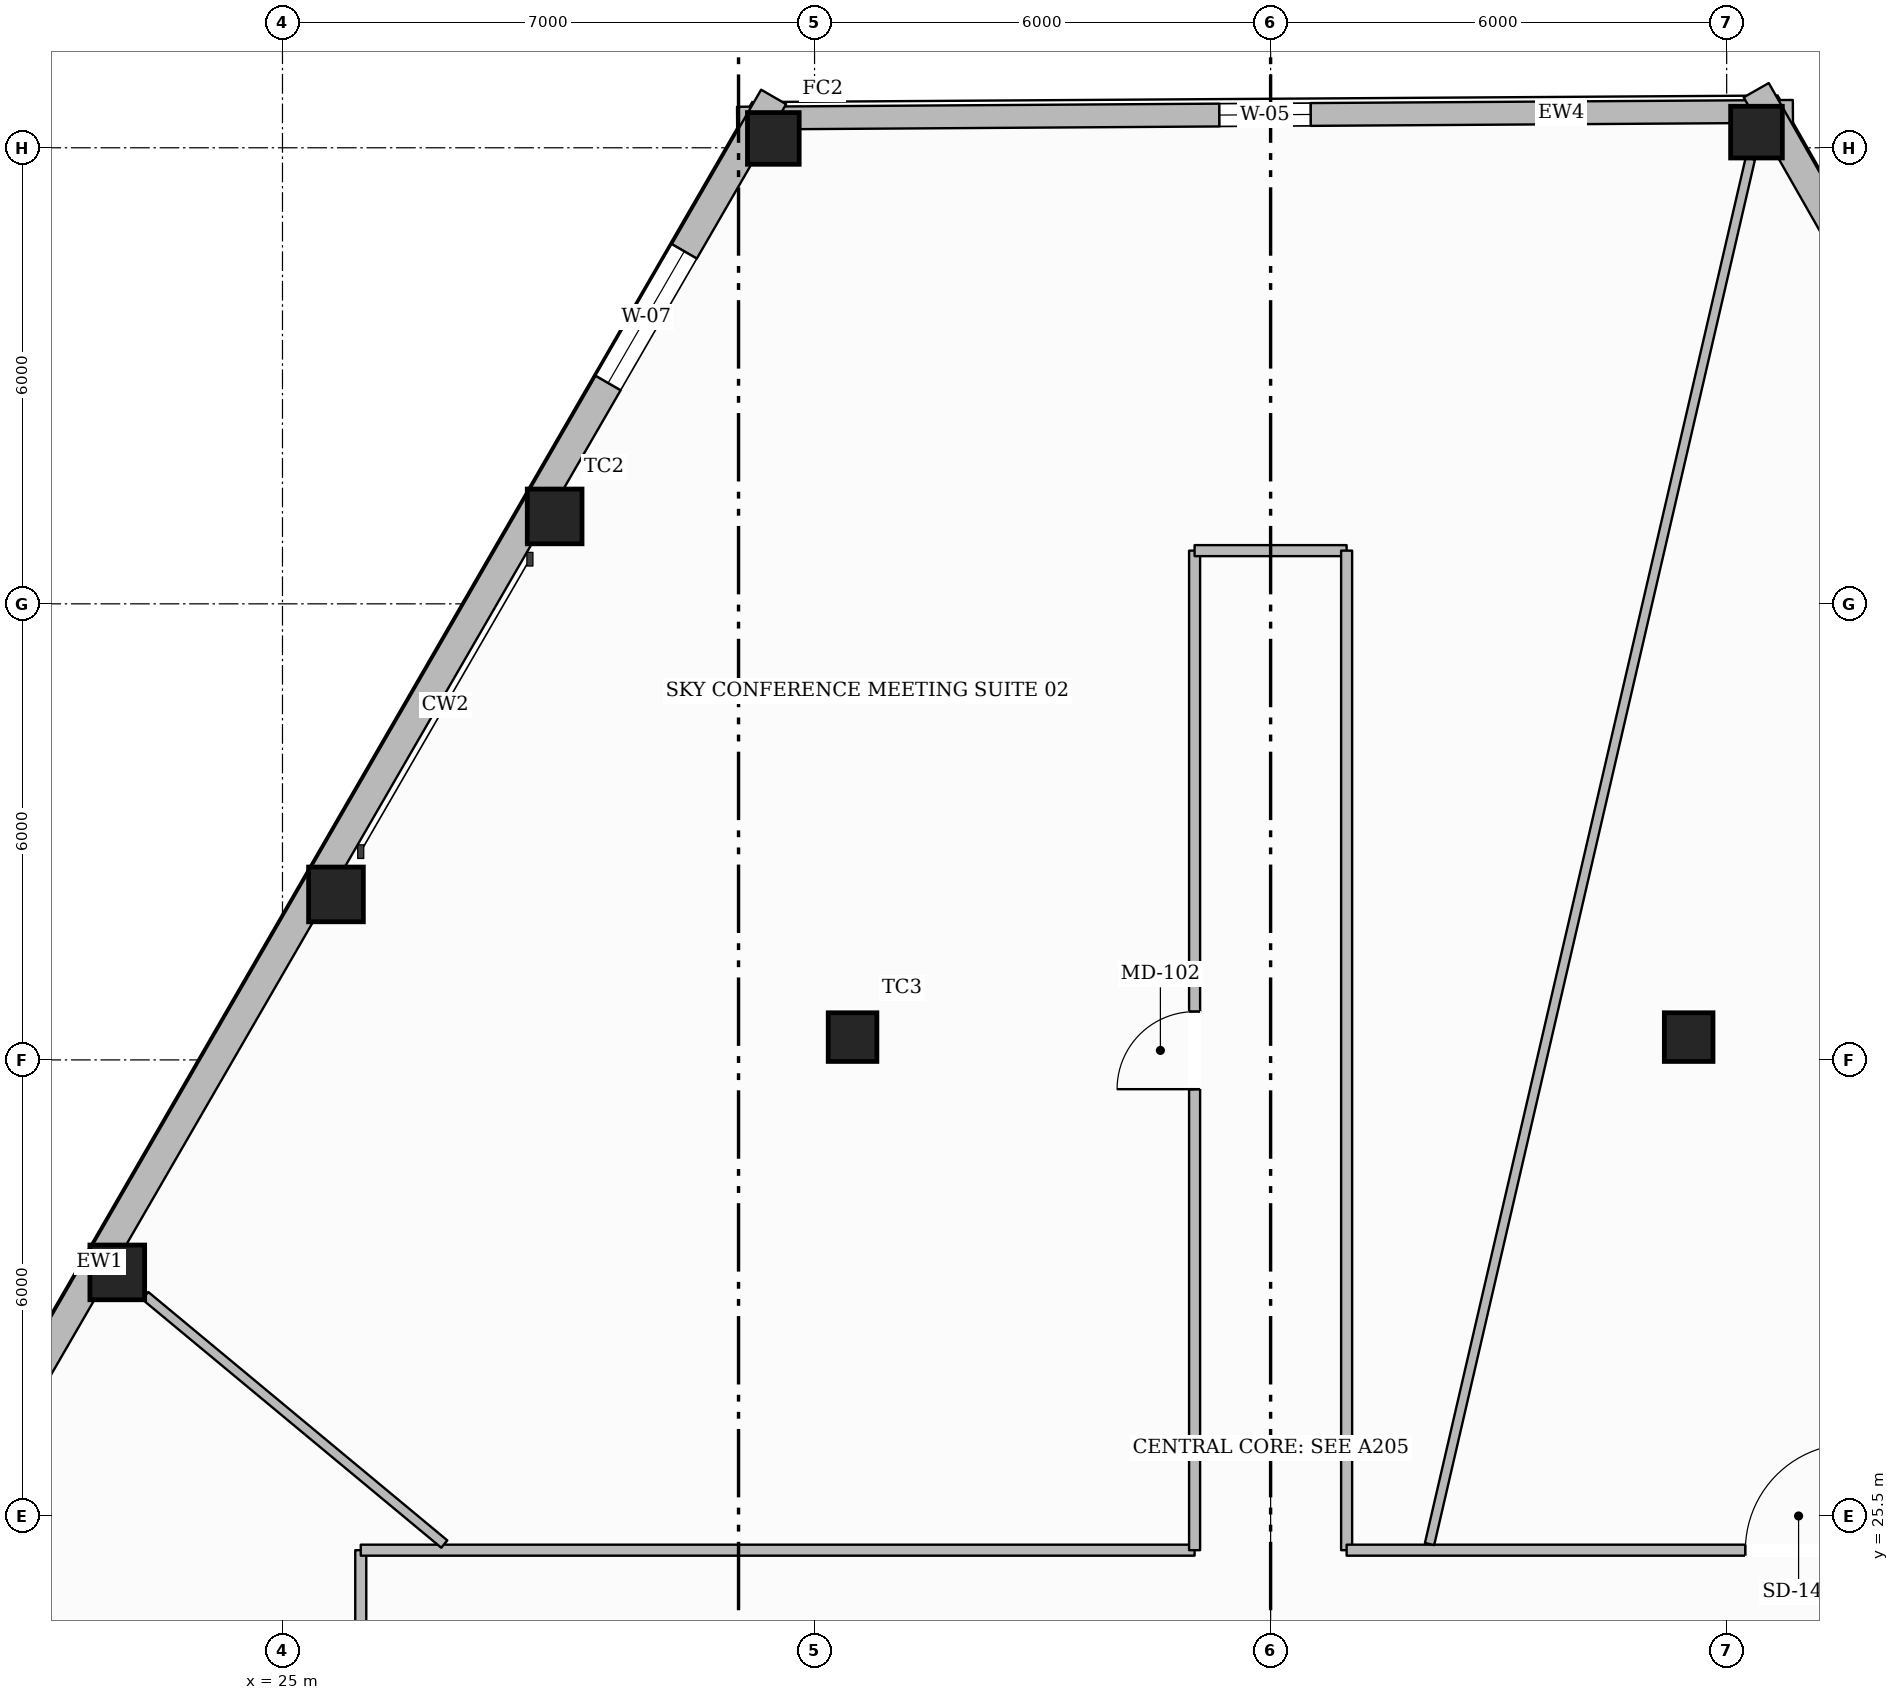
"""IFC4 building model, lengths in metres.
Left out: names, types, materials, properties, quantities, classifications, styles, units other than length and angle.
Written with IfcOpenShell. Run it as: python <this file> out.ifc"""

import sys

from ifc_helpers import new_model, si_unit, direction, frame, frame_2d, origin, origin_2d, place, context, subcontext, project, spatial, rectangle, hollow_rectangle, extrude, element, fill, save


model = new_model("IFC4")
c1 = context("Model", 3, precision=1e-05, world=origin(), true_north=direction((0.0, 1.0)))
c2 = subcontext(c1, "Body", "Model", "MODEL_VIEW")
j1 = project(units=[si_unit("LENGTHUNIT", "METRE"), si_unit("PLANEANGLEUNIT", "RADIAN")], contexts=[c1])
p1 = place(None, origin())
s1 = spatial("IfcSite", under=j1, at=p1, CompositionType="ELEMENT")
p2 = place(p1, origin())
s2 = spatial("IfcBuilding", under=s1, at=p2, CompositionType="ELEMENT")
p3 = place(p2, frame((0.0, 0.0, 80.5)))
s3 = spatial("IfcBuildingStorey", under=s2, at=p3, CompositionType="ELEMENT", Elevation=80.5)
p4 = place(p3, frame((31.458, 43.623, 0.0), z_axis=(0.0, 0.0, 1.0), x_axis=(1.0, 0.0, 0.0)))
e1 = element("IfcColumn", 1, at=p4, inside=s3, PredefinedType="COLUMN", context=c2, shape_type="SweptSolid", body=[
    extrude(hollow_rectangle(XDim=0.68, YDim=0.68, WallThickness=0.03, at=origin_2d()), origin(), (0.0, 0.0, 1.0), 4.75),
])
for number, where, z_axis, x_axis in (
    (2, (28.581, 38.65, 0.0), (0.0, 0.0, 1.0), (1.0, 0.0, 0.0)),
    (3, (25.704, 33.677, 0.0), (0.0, 0.0, 1.0), (1.0, 0.0, 0.0)),
    (4, (22.827, 28.704, 0.0), (0.0, 0.0, 1.0), (1.0, 0.0, 0.0)),
):
    element("IfcColumn", number, at=place(p3, frame(where, z_axis=z_axis, x_axis=x_axis)), inside=s3, PredefinedType="COLUMN", context=c2, shape_type="SweptSolid", body=[
        extrude(hollow_rectangle(XDim=0.72, YDim=0.72, WallThickness=0.032, at=origin_2d()), origin(), (0.0, 0.0, 1.0), 4.75),
    ])
p5 = place(p3, frame((44.392, 43.706, 0.0), z_axis=(0.0, 0.0, 1.0), x_axis=(1.0, 0.0, 0.0)))
e5 = element("IfcColumn", 5, at=p5, inside=s3, PredefinedType="COLUMN", context=c2, shape_type="SweptSolid", body=[
    extrude(hollow_rectangle(XDim=0.68, YDim=0.68, WallThickness=0.03, at=origin_2d()), origin(), (0.0, 0.0, 1.0), 4.75),
])
for number, where, z_axis, x_axis in (
    (6, (32.5, 31.8, 0.0), (0.0, 0.0, 1.0), (1.0, 0.0, 0.0)),
    (7, (43.5, 31.8, 0.0), (0.0, 0.0, 1.0), (1.0, 0.0, 0.0)),
):
    element("IfcColumn", number, at=place(p3, frame(where, z_axis=z_axis, x_axis=x_axis)), inside=s3, PredefinedType="COLUMN", context=c2, shape_type="SweptSolid", body=[
        extrude(hollow_rectangle(XDim=0.64, YDim=0.64, WallThickness=0.028, at=origin_2d()), origin(), (0.0, 0.0, 1.0), 4.75),
    ])
p6 = place(p3, frame((30.981, 43.89, 0.0), z_axis=(0.0, 0.0, 1.0), x_axis=(0.999979308796, 0.006432882677, 0.0)))
e8 = element("IfcWall", 8, at=p6, inside=s3, PredefinedType="STANDARD", context=c2, shape_type="SweptSolid", body=[
    extrude(rectangle(XDim=13.89, YDim=0.3, at=frame_2d((6.945, 0.0))), origin(), (0.0, 0.0, 1.0), 4.209),
])
p7 = place(p6, frame((6.345, 0.0, 0.65)))
e9 = element("IfcOpeningElement", 9, at=p7, cuts=e8, PredefinedType="OPENING", context=c2, shape_type="SweptSolid", body=[
    extrude(rectangle(XDim=1.2, YDim=1.7, at=frame_2d((0.6, 0.85))), frame((0.0, 0.16, 0.0), z_axis=(0.0, -1.0, 0.0), x_axis=(1.0, 0.0, 0.0)), (0.0, 0.0, 1.0), 0.32),
])
p8 = place(p3, frame((13.724, 13.51, 0.0), z_axis=(0.0, 0.0, 1.0), x_axis=(0.500779221595, 0.865575052331, 0.0)))
e10 = element("IfcWall", 10, at=p8, inside=s3, PredefinedType="STANDARD", context=c2, shape_type="SweptSolid", body=[
    extrude(rectangle(XDim=35.421, YDim=0.38, at=frame_2d((17.71, 0.0))), origin(), (0.0, 0.0, 1.0), 4.209),
])
p9 = place(p8, frame((31.073, 0.0, 0.65)))
e11 = element("IfcOpeningElement", 11, at=p9, cuts=e10, PredefinedType="OPENING", context=c2, shape_type="SweptSolid", body=[
    extrude(rectangle(XDim=2.0, YDim=2.25, at=frame_2d((1.0, 1.125))), frame((0.0, 0.2, 0.0), z_axis=(0.0, -1.0, 0.0), x_axis=(1.0, 0.0, 0.0)), (0.0, 0.0, 1.0), 0.4),
])
p10 = place(p8, frame((2.348, 0.0, 0.65)))
e12 = element("IfcOpeningElement", 12, at=p10, cuts=e10, PredefinedType="OPENING", context=c2, shape_type="SweptSolid", body=[
    extrude(rectangle(XDim=2.0, YDim=2.25, at=frame_2d((1.0, 1.125))), frame((0.0, 0.2, 0.0), z_axis=(0.0, -1.0, 0.0), x_axis=(1.0, 0.0, 0.0)), (0.0, 0.0, 1.0), 0.4),
])
p11 = place(p3, frame((44.389, 44.257, 0.0), z_axis=(0.0, 0.0, 1.0), x_axis=(0.495210354805, -0.868773102999, 0.0)))
e13 = element("IfcWall", 13, at=p11, inside=s3, PredefinedType="STANDARD", context=c2, shape_type="SweptSolid", body=[
    extrude(rectangle(XDim=35.035, YDim=0.38, at=frame_2d((17.518, 0.0))), origin(), (0.0, 0.0, 1.0), 4.209),
])
p12 = place(p11, frame((30.72, 0.0, 0.65)))
e14 = element("IfcOpeningElement", 14, at=p12, cuts=e13, PredefinedType="OPENING", context=c2, shape_type="SweptSolid", body=[
    extrude(rectangle(XDim=2.0, YDim=2.25, at=frame_2d((1.0, 1.125))), frame((0.0, 0.2, 0.0), z_axis=(0.0, -1.0, 0.0), x_axis=(1.0, 0.0, 0.0)), (0.0, 0.0, 1.0), 0.4),
])
p13 = place(p11, frame((2.321, 0.0, 0.65)))
e15 = element("IfcOpeningElement", 15, at=p13, cuts=e13, PredefinedType="OPENING", context=c2, shape_type="SweptSolid", body=[
    extrude(rectangle(XDim=2.0, YDim=2.25, at=frame_2d((1.0, 1.125))), frame((0.0, 0.2, 0.0), z_axis=(0.0, -1.0, 0.0), x_axis=(1.0, 0.0, 0.0)), (0.0, 0.0, 1.0), 0.4),
])
p14 = place(p3, frame((26.03, 9.15, 0.0), z_axis=(0.0, 0.0, 1.0), x_axis=(0.0, 1.0, 0.0)))
e16 = element("IfcWall", 16, at=p14, inside=s3, PredefinedType="PARTITIONING", context=c2, shape_type="SweptSolid", body=[
    extrude(rectangle(XDim=15.9, YDim=0.145, at=frame_2d((7.95, 0.0))), origin(), (0.0, 0.0, 1.0), 4.438),
])
p15 = place(p14, frame((7.25, 0.0, 0.0)))
e17 = element("IfcOpeningElement", 17, at=p15, cuts=e16, PredefinedType="OPENING", context=c2, shape_type="SweptSolid", body=[
    extrude(rectangle(XDim=1.4, YDim=2.2, at=frame_2d((0.7, 1.1))), frame((0.0, 0.083, 0.0), z_axis=(0.0, -1.0, 0.0), x_axis=(1.0, 0.0, 0.0)), (0.0, 0.0, 1.0), 0.165),
])
p16 = place(p3, frame((26.03, 25.05, 0.0), z_axis=(0.0, 0.0, 1.0), x_axis=(1.0, 0.0, 0.0)))
e18 = element("IfcWall", 18, at=p16, inside=s3, PredefinedType="PARTITIONING", context=c2, shape_type="SweptSolid", body=[
    extrude(rectangle(XDim=10.97, YDim=0.145, at=frame_2d((5.485, 0.0))), origin(), (0.0, 0.0, 1.0), 4.75),
])
p17 = place(p3, frame((37.0, 25.05, 0.0), z_axis=(0.0, 0.0, 1.0), x_axis=(0.0, 1.0, 0.0)))
e19 = element("IfcWall", 19, at=p17, inside=s3, PredefinedType="PARTITIONING", context=c2, shape_type="SweptSolid", body=[
    extrude(rectangle(XDim=13.15, YDim=0.145, at=frame_2d((6.575, 0.0))), origin(), (0.0, 0.0, 1.0), 4.75),
])
p18 = place(p17, frame((6.065, 0.0, 0.0)))
e20 = element("IfcOpeningElement", 20, at=p18, cuts=e19, PredefinedType="OPENING", context=c2, shape_type="SweptSolid", body=[
    extrude(rectangle(XDim=1.02, YDim=2.15, at=frame_2d((0.51, 1.075))), frame((0.0, 0.083, 0.0), z_axis=(0.0, -1.0, 0.0), x_axis=(1.0, 0.0, 0.0)), (0.0, 0.0, 1.0), 0.165),
])
p19 = place(p3, frame((37.0, 38.2, 0.0), z_axis=(0.0, 0.0, 1.0), x_axis=(1.0, 0.0, 0.0)))
e21 = element("IfcWall", 21, at=p19, inside=s3, PredefinedType="PARTITIONING", context=c2, shape_type="SweptSolid", body=[
    extrude(rectangle(XDim=2.0, YDim=0.145, at=frame_2d((1.0, 0.0))), origin(), (0.0, 0.0, 1.0), 4.75),
])
p20 = place(p3, frame((39.0, 38.2, 0.0), z_axis=(0.0, 0.0, 1.0), x_axis=(0.0, -1.0, 0.0)))
e22 = element("IfcWall", 22, at=p20, inside=s3, PredefinedType="PARTITIONING", context=c2, shape_type="SweptSolid", body=[
    extrude(rectangle(XDim=13.15, YDim=0.145, at=frame_2d((6.575, 0.0))), origin(), (0.0, 0.0, 1.0), 4.75),
])
p21 = place(p3, frame((39.0, 25.05, 0.0), z_axis=(0.0, 0.0, 1.0), x_axis=(1.0, 0.0, 0.0)))
e23 = element("IfcWall", 23, at=p21, inside=s3, PredefinedType="PARTITIONING", context=c2, shape_type="SweptSolid", body=[
    extrude(rectangle(XDim=10.97, YDim=0.145, at=frame_2d((5.485, 0.0))), origin(), (0.0, 0.0, 1.0), 4.75),
])
p22 = place(p21, frame((5.246, 0.0, 0.0)))
e24 = element("IfcOpeningElement", 24, at=p22, cuts=e23, PredefinedType="OPENING", context=c2, shape_type="SweptSolid", body=[
    extrude(rectangle(XDim=1.4, YDim=2.2, at=frame_2d((0.7, 1.1))), frame((0.0, 0.083, 0.0), z_axis=(0.0, -1.0, 0.0), x_axis=(1.0, 0.0, 0.0)), (0.0, 0.0, 1.0), 0.165),
])
p23 = place(p3, frame((40.091, 25.131, 0.0), z_axis=(0.0, 0.0, 1.0), x_axis=(0.225578020125, 0.974225105834, 0.0)))
e25 = element("IfcWall", 25, at=p23, inside=s3, PredefinedType="PARTITIONING", context=c2, shape_type="SweptSolid", body=[
    extrude(rectangle(XDim=18.709, YDim=0.125, at=frame_2d((9.355, 0.0))), origin(), (0.0, 0.0, 1.0), 4.75),
])
p24 = place(p3, frame((27.129, 25.131, 0.0), z_axis=(0.0, 0.0, 1.0), x_axis=(-0.769233686847, 0.638967553964, 0.0)))
e26 = element("IfcWall", 26, at=p24, inside=s3, PredefinedType="PARTITIONING", context=c2, shape_type="SweptSolid", body=[
    extrude(rectangle(XDim=5.115, YDim=0.125, at=frame_2d((2.557, 0.0))), origin(), (0.0, 0.0, 1.0), 4.291),
])
p25 = place(p9, origin())
e27 = element("IfcWindow", 27, at=p25, inside=s3, PartitioningType="SINGLE_PANEL", PredefinedType="WINDOW", context=c2, shape_type="SweptSolid", body=[
    extrude(rectangle(XDim=2.0, YDim=2.25, at=frame_2d((1.0, 1.125))), frame((0.0, 0.03, 0.0), z_axis=(0.0, -1.0, 0.0), x_axis=(1.0, 0.0, 0.0)), (0.0, 0.0, 1.0), 0.06),
])
fill(e11, e27)
p26 = place(p7, origin())
e28 = element("IfcWindow", 28, at=p26, inside=s3, PartitioningType="SINGLE_PANEL", PredefinedType="WINDOW", context=c2, shape_type="SweptSolid", body=[
    extrude(rectangle(XDim=1.2, YDim=1.7, at=frame_2d((0.6, 0.85))), frame((0.0, 0.03, 0.0), z_axis=(0.0, -1.0, 0.0), x_axis=(1.0, 0.0, 0.0)), (0.0, 0.0, 1.0), 0.06),
])
fill(e9, e28)
p27 = place(p22, origin())
e29 = element("IfcDoor", 29, at=p27, inside=s3, OperationType="SINGLE_SWING_RIGHT", PredefinedType="DOOR", context=c2, shape_type="SweptSolid", body=[
    extrude(rectangle(XDim=1.4, YDim=2.2, at=frame_2d((0.7, 1.1))), frame((0.0, 0.025, 0.0), z_axis=(0.0, -1.0, 0.0), x_axis=(1.0, 0.0, 0.0)), (0.0, 0.0, 1.0), 0.05),
])
fill(e24, e29)
p28 = place(p18, origin())
e30 = element("IfcDoor", 30, at=p28, inside=s3, OperationType="SINGLE_SWING_LEFT", PredefinedType="DOOR", context=c2, shape_type="SweptSolid", body=[
    extrude(rectangle(XDim=1.02, YDim=2.15, at=frame_2d((0.51, 1.075))), frame((0.0, 0.025, 0.0), z_axis=(0.0, -1.0, 0.0), x_axis=(1.0, 0.0, 0.0)), (0.0, 0.0, 1.0), 0.05),
])
fill(e20, e30)
save(model, sys.argv[1])
